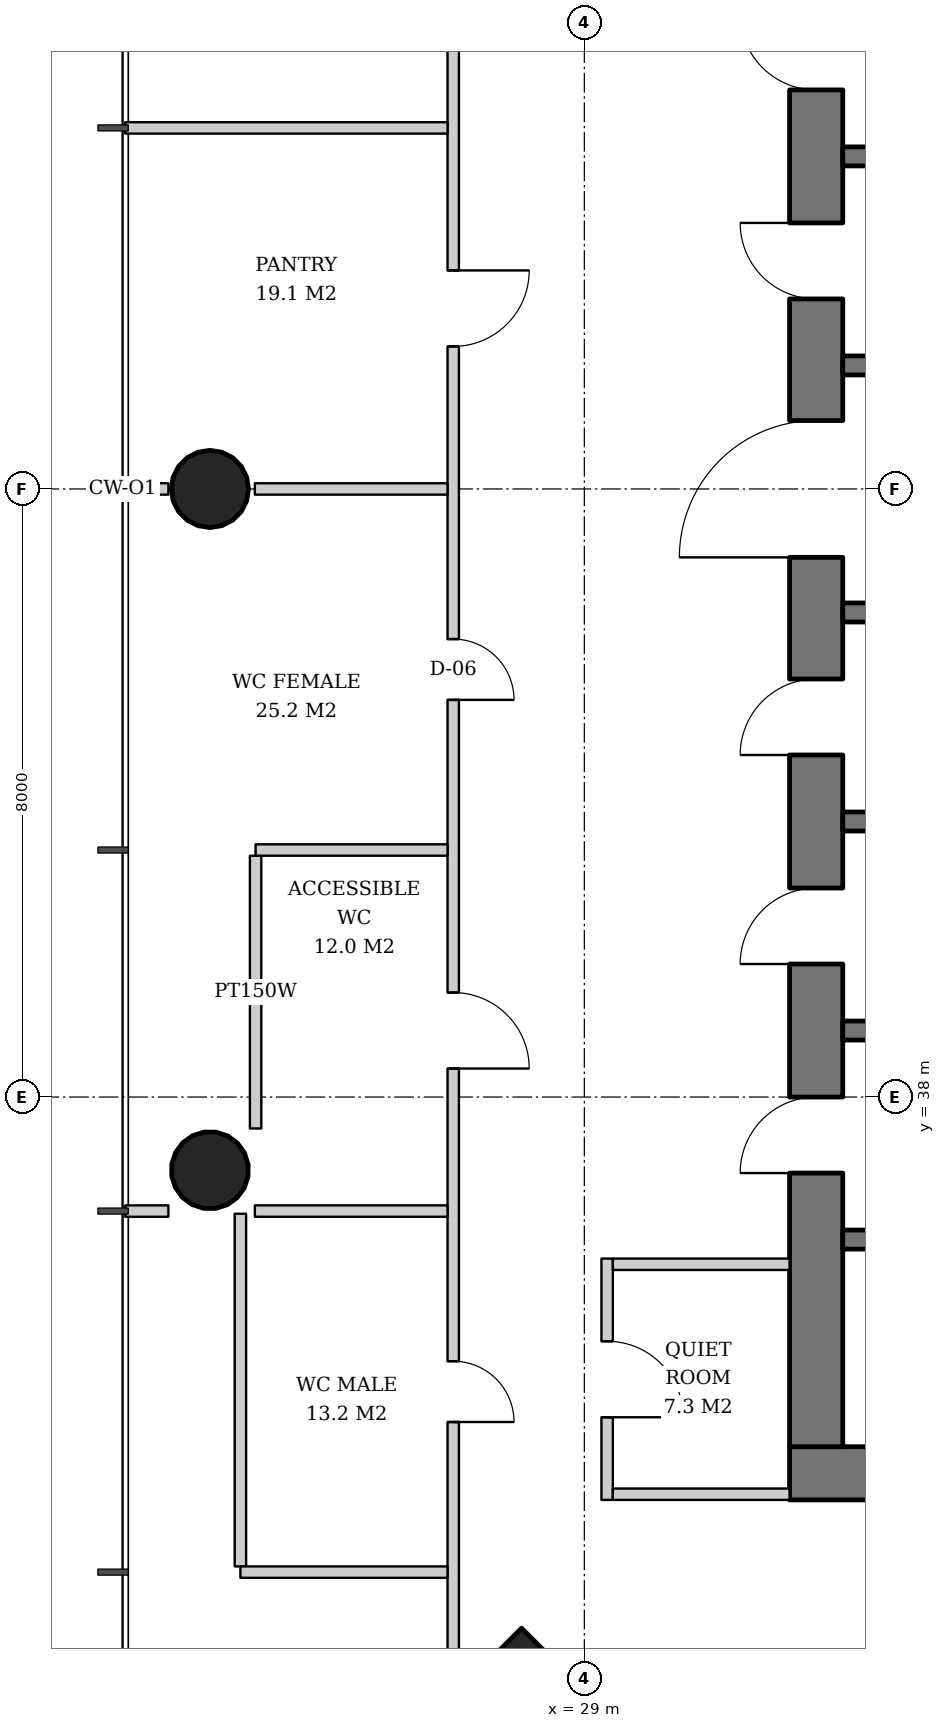
"""IFC4 building model, lengths in metres.
Left out: names, types, materials, properties, quantities, classifications, styles, units other than length and angle.
Written with IfcOpenShell. Run it as: python <this file> out.ifc"""

import sys

from ifc_helpers import new_model, si_unit, direction, frame, frame_2d, origin, origin_2d, place, context, subcontext, project, spatial, rectangle, hollow_circle, extrude, element, fill, save


model = new_model("IFC4")
c1 = context("Model", 3, precision=1e-05, world=origin(), true_north=direction((0.0, 1.0)))
c2 = subcontext(c1, "Body", "Model", "MODEL_VIEW")
j1 = project(units=[si_unit("LENGTHUNIT", "METRE"), si_unit("PLANEANGLEUNIT", "RADIAN")], contexts=[c1])
p1 = place(None, origin())
s1 = spatial("IfcSite", under=j1, at=p1, CompositionType="ELEMENT")
p2 = place(p1, origin())
s2 = spatial("IfcBuilding", under=s1, at=p2, CompositionType="ELEMENT")
p3 = place(p2, frame((0.0, 0.0, 116.0)))
s3 = spatial("IfcBuildingStorey", under=s2, at=p3, CompositionType="ELEMENT", Elevation=116.0)
p4 = place(p3, frame((28.136, 29.136, 0.0), z_axis=(0.031898107953, 0.031898107953, 0.998981992539), x_axis=(-0.707106781187, 0.707106781187, 0.0)))
e1 = element("IfcColumn", 1, at=p4, inside=s3, PredefinedType="COLUMN", context=c2, shape_type="SweptSolid", body=[
    extrude(rectangle(XDim=2.6, YDim=2.6, at=origin_2d()), origin(), (0.0, 0.0, 1.0), 3.804),
])
p5 = place(p3, frame((24.036, 46.0, 0.0), z_axis=(0.031978496719, 0.0, 0.999488557087), x_axis=(0.0, 1.0, 0.0)))
e2 = element("IfcColumn", 2, at=p5, inside=s3, PredefinedType="COLUMN", context=c2, shape_type="SweptSolid", body=[
    extrude(hollow_circle(Radius=0.508, WallThickness=0.04, at=origin_2d()), origin(), (0.0, 0.0, 1.0), 3.802),
])
p6 = place(p3, frame((24.036, 37.018, 0.0), z_axis=(0.031974409754, 0.015987204877, 0.999360818924), x_axis=(-0.4472135955, 0.894427191, 0.0)))
e3 = element("IfcColumn", 3, at=p6, inside=s3, PredefinedType="COLUMN", context=c2, shape_type="SweptSolid", body=[
    extrude(hollow_circle(Radius=0.508, WallThickness=0.04, at=origin_2d()), origin(), (0.0, 0.0, 1.0), 3.802),
])
p7 = place(p3, frame((31.7, 33.05, 0.0), z_axis=(0.0, 0.0, 1.0), x_axis=(1.0, 0.0, 0.0)))
e4 = element("IfcWall", 4, at=p7, inside=s3, PredefinedType="SHEAR", context=c2, shape_type="SweptSolid", body=[
    extrude(rectangle(XDim=26.6, YDim=0.7, at=frame_2d((13.3, 0.0))), origin(), (0.0, 0.0, 1.0), 3.8),
])
p8 = place(p7, frame((7.3, 0.0, 0.0)))
e5 = element("IfcOpeningElement", 5, at=p8, cuts=e4, PredefinedType="OPENING", context=c2, shape_type="SweptSolid", body=[
    extrude(rectangle(XDim=1.0, YDim=2.1, at=frame_2d((0.5, 1.05))), frame((0.0, 0.36, 0.0), z_axis=(0.0, -1.0, 0.0), x_axis=(1.0, 0.0, 0.0)), (0.0, 0.0, 1.0), 0.72),
])
p9 = place(p7, frame((18.75, 0.0, 0.0)))
e6 = element("IfcOpeningElement", 6, at=p9, cuts=e4, PredefinedType="OPENING", context=c2, shape_type="SweptSolid", body=[
    extrude(rectangle(XDim=1.0, YDim=2.1, at=frame_2d((0.5, 1.05))), frame((0.0, 0.36, 0.0), z_axis=(0.0, -1.0, 0.0), x_axis=(1.0, 0.0, 0.0)), (0.0, 0.0, 1.0), 0.72),
])
p10 = place(p7, frame((3.2, 0.0, 0.0)))
e7 = element("IfcOpeningElement", 7, at=p10, cuts=e4, PredefinedType="OPENING", context=c2, shape_type="SweptSolid", body=[
    extrude(rectangle(XDim=1.0, YDim=2.1, at=frame_2d((0.5, 1.05))), frame((0.0, 0.36, 0.0), z_axis=(0.0, -1.0, 0.0), x_axis=(1.0, 0.0, 0.0)), (0.0, 0.0, 1.0), 0.72),
])
p11 = place(p7, frame((10.42, 0.0, 0.0)))
e8 = element("IfcOpeningElement", 8, at=p11, cuts=e4, PredefinedType="OPENING", context=c2, shape_type="SweptSolid", body=[
    extrude(rectangle(XDim=1.0, YDim=2.1, at=frame_2d((0.5, 1.05))), frame((0.0, 0.36, 0.0), z_axis=(0.0, -1.0, 0.0), x_axis=(1.0, 0.0, 0.0)), (0.0, 0.0, 1.0), 0.72),
])
p12 = place(p7, frame((14.46, 0.0, 0.0)))
e9 = element("IfcOpeningElement", 9, at=p12, cuts=e4, PredefinedType="OPENING", context=c2, shape_type="SweptSolid", body=[
    extrude(rectangle(XDim=1.0, YDim=2.1, at=frame_2d((0.5, 1.05))), frame((0.0, 0.36, 0.0), z_axis=(0.0, -1.0, 0.0), x_axis=(1.0, 0.0, 0.0)), (0.0, 0.0, 1.0), 0.72),
])
p13 = place(p7, frame((22.5, 0.0, 0.0)))
e10 = element("IfcOpeningElement", 10, at=p13, cuts=e4, PredefinedType="OPENING", context=c2, shape_type="SweptSolid", body=[
    extrude(rectangle(XDim=1.0, YDim=2.1, at=frame_2d((0.5, 1.05))), frame((0.0, 0.36, 0.0), z_axis=(0.0, -1.0, 0.0), x_axis=(1.0, 0.0, 0.0)), (0.0, 0.0, 1.0), 0.72),
])
p14 = place(p3, frame((32.05, 33.4, 0.0), z_axis=(0.0, 0.0, 1.0), x_axis=(0.0, 1.0, 0.0)))
e11 = element("IfcWall", 11, at=p14, inside=s3, PredefinedType="SHEAR", context=c2, shape_type="SweptSolid", body=[
    extrude(rectangle(XDim=25.2, YDim=0.7, at=frame_2d((12.6, 0.0))), origin(), (0.0, 0.0, 1.0), 3.8),
])
p15 = place(p14, frame((11.7, 0.0, 0.0)))
e12 = element("IfcOpeningElement", 12, at=p15, cuts=e11, PredefinedType="OPENING", context=c2, shape_type="SweptSolid", body=[
    extrude(rectangle(XDim=1.8, YDim=2.4, at=frame_2d((0.9, 1.2))), frame((0.0, 0.36, 0.0), z_axis=(0.0, -1.0, 0.0), x_axis=(1.0, 0.0, 0.0)), (0.0, 0.0, 1.0), 0.72),
])
p16 = place(p14, frame((3.6, 0.0, 0.0)))
e13 = element("IfcOpeningElement", 13, at=p16, cuts=e11, PredefinedType="OPENING", context=c2, shape_type="SweptSolid", body=[
    extrude(rectangle(XDim=1.0, YDim=2.1, at=frame_2d((0.5, 1.05))), frame((0.0, 0.36, 0.0), z_axis=(0.0, -1.0, 0.0), x_axis=(1.0, 0.0, 0.0)), (0.0, 0.0, 1.0), 0.72),
])
p17 = place(p14, frame((6.35, 0.0, 0.0)))
e14 = element("IfcOpeningElement", 14, at=p17, cuts=e11, PredefinedType="OPENING", context=c2, shape_type="SweptSolid", body=[
    extrude(rectangle(XDim=1.0, YDim=2.1, at=frame_2d((0.5, 1.05))), frame((0.0, 0.36, 0.0), z_axis=(0.0, -1.0, 0.0), x_axis=(1.0, 0.0, 0.0)), (0.0, 0.0, 1.0), 0.72),
])
p18 = place(p14, frame((9.1, 0.0, 0.0)))
e15 = element("IfcOpeningElement", 15, at=p18, cuts=e11, PredefinedType="OPENING", context=c2, shape_type="SweptSolid", body=[
    extrude(rectangle(XDim=1.0, YDim=2.1, at=frame_2d((0.5, 1.05))), frame((0.0, 0.36, 0.0), z_axis=(0.0, -1.0, 0.0), x_axis=(1.0, 0.0, 0.0)), (0.0, 0.0, 1.0), 0.72),
])
p19 = place(p14, frame((15.1, 0.0, 0.0)))
e16 = element("IfcOpeningElement", 16, at=p19, cuts=e11, PredefinedType="OPENING", context=c2, shape_type="SweptSolid", body=[
    extrude(rectangle(XDim=1.0, YDim=2.1, at=frame_2d((0.5, 1.05))), frame((0.0, 0.36, 0.0), z_axis=(0.0, -1.0, 0.0), x_axis=(1.0, 0.0, 0.0)), (0.0, 0.0, 1.0), 0.72),
])
p20 = place(p14, frame((17.85, 0.0, 0.0)))
e17 = element("IfcOpeningElement", 17, at=p20, cuts=e11, PredefinedType="OPENING", context=c2, shape_type="SweptSolid", body=[
    extrude(rectangle(XDim=1.0, YDim=2.1, at=frame_2d((0.5, 1.05))), frame((0.0, 0.36, 0.0), z_axis=(0.0, -1.0, 0.0), x_axis=(1.0, 0.0, 0.0)), (0.0, 0.0, 1.0), 0.72),
])
for number, where, z_axis, x_axis in (
    (18, (32.4, 36.125, 0.0), (0.0, 0.0, 1.0), (1.0, 0.0, 0.0)),
    (19, (32.4, 38.875, 0.0), (0.0, 0.0, 1.0), (1.0, 0.0, 0.0)),
    (20, (32.4, 41.625, 0.0), (0.0, 0.0, 1.0), (1.0, 0.0, 0.0)),
    (21, (32.4, 44.375, 0.0), (0.0, 0.0, 1.0), (1.0, 0.0, 0.0)),
    (22, (32.4, 47.625, 0.0), (0.0, 0.0, 1.0), (1.0, 0.0, 0.0)),
    (23, (32.4, 50.375, 0.0), (0.0, 0.0, 1.0), (1.0, 0.0, 0.0)),
):
    element("IfcWall", number, at=place(p3, frame(where, z_axis=z_axis, x_axis=x_axis)), inside=s3, PredefinedType="SHEAR", context=c2, shape_type="SweptSolid", body=[
        extrude(rectangle(XDim=2.7, YDim=0.25, at=frame_2d((1.35, 0.0))), origin(), (0.0, 0.0, 1.0), 3.8),
    ])
p21 = place(p3, frame((29.3, 35.875, 0.0), z_axis=(0.0, 0.0, 1.0), x_axis=(0.0, -1.0, 0.0)))
e24 = element("IfcWall", 24, at=p21, inside=s3, PredefinedType="PARTITIONING", context=c2, shape_type="SweptSolid", body=[
    extrude(rectangle(XDim=3.175, YDim=0.15, at=frame_2d((1.587, 0.0))), origin(), (0.0, 0.0, 1.0), 2.806),
])
p22 = place(p21, frame((1.087, 0.0, 0.0)))
e25 = element("IfcOpeningElement", 25, at=p22, cuts=e24, PredefinedType="OPENING", context=c2, shape_type="SweptSolid", body=[
    extrude(rectangle(XDim=1.0, YDim=2.1, at=frame_2d((0.5, 1.05))), frame((0.0, 0.085, 0.0), z_axis=(0.0, -1.0, 0.0), x_axis=(1.0, 0.0, 0.0)), (0.0, 0.0, 1.0), 0.17),
])
for number, where, z_axis, x_axis in (
    (26, (31.7, 35.8, 0.0), (0.0, 0.0, 1.0), (-1.0, 0.0, 0.0)),
    (27, (31.7, 32.775, 0.0), (0.0, 0.0, 1.0), (-1.0, 0.0, 0.0)),
):
    element("IfcWall", number, at=place(p3, frame(where, z_axis=z_axis, x_axis=x_axis)), inside=s3, PredefinedType="PARTITIONING", context=c2, shape_type="SweptSolid", body=[
        extrude(rectangle(XDim=2.325, YDim=0.15, at=frame_2d((1.163, 0.0))), origin(), (0.0, 0.0, 1.0), 3.62),
    ])
p23 = place(p3, frame((24.675, 41.175, 0.0), z_axis=(0.0, 0.0, 1.0), x_axis=(0.0, -1.0, 0.0)))
e28 = element("IfcWall", 28, at=p23, inside=s3, PredefinedType="PARTITIONING", context=c2, shape_type="SweptSolid", body=[
    extrude(rectangle(XDim=3.588, YDim=0.15, at=frame_2d((1.794, 0.0))), origin(), (0.0, 0.0, 1.0), 2.806),
])
p24 = place(p3, frame((24.475, 36.465, 0.0), z_axis=(0.0, 0.0, 1.0), x_axis=(0.0, -1.0, 0.0)))
e29 = element("IfcWall", 29, at=p24, inside=s3, PredefinedType="PARTITIONING", context=c2, shape_type="SweptSolid", body=[
    extrude(rectangle(XDim=4.64, YDim=0.15, at=frame_2d((2.32, 0.0))), origin(), (0.0, 0.0, 1.0), 2.806),
])
p25 = place(p3, frame((27.275, 61.812, 0.0), z_axis=(0.0, 0.0, 1.0), x_axis=(0.0, -1.0, 0.0)))
e30 = element("IfcWall", 30, at=p25, inside=s3, PredefinedType="PARTITIONING", context=c2, shape_type="SweptSolid", body=[
    extrude(rectangle(XDim=31.623, YDim=0.15, at=frame_2d((15.812, 0.0))), origin(), (0.0, 0.0, 1.0), 2.72),
])
p26 = place(p25, frame((3.437, 0.0, 0.0)))
e31 = element("IfcOpeningElement", 31, at=p26, cuts=e30, PredefinedType="OPENING", context=c2, shape_type="SweptSolid", body=[
    extrude(rectangle(XDim=1.0, YDim=2.1, at=frame_2d((0.5, 1.05))), frame((0.0, 0.085, 0.0), z_axis=(0.0, -1.0, 0.0), x_axis=(1.0, 0.0, 0.0)), (0.0, 0.0, 1.0), 0.17),
])
p27 = place(p25, frame((8.187, 0.0, 0.0)))
e32 = element("IfcOpeningElement", 32, at=p27, cuts=e30, PredefinedType="OPENING", context=c2, shape_type="SweptSolid", body=[
    extrude(rectangle(XDim=1.0, YDim=2.1, at=frame_2d((0.5, 1.05))), frame((0.0, 0.085, 0.0), z_axis=(0.0, -1.0, 0.0), x_axis=(1.0, 0.0, 0.0)), (0.0, 0.0, 1.0), 0.17),
])
p28 = place(p25, frame((12.937, 0.0, 0.0)))
e33 = element("IfcOpeningElement", 33, at=p28, cuts=e30, PredefinedType="OPENING", context=c2, shape_type="SweptSolid", body=[
    extrude(rectangle(XDim=1.0, YDim=2.1, at=frame_2d((0.5, 1.05))), frame((0.0, 0.085, 0.0), z_axis=(0.0, -1.0, 0.0), x_axis=(1.0, 0.0, 0.0)), (0.0, 0.0, 1.0), 0.17),
])
p29 = place(p25, frame((17.787, 0.0, 0.0)))
e34 = element("IfcOpeningElement", 34, at=p29, cuts=e30, PredefinedType="OPENING", context=c2, shape_type="SweptSolid", body=[
    extrude(rectangle(XDim=0.8, YDim=2.1, at=frame_2d((0.4, 1.05))), frame((0.0, 0.085, 0.0), z_axis=(0.0, -1.0, 0.0), x_axis=(1.0, 0.0, 0.0)), (0.0, 0.0, 1.0), 0.17),
])
p30 = place(p25, frame((22.437, 0.0, 0.0)))
e35 = element("IfcOpeningElement", 35, at=p30, cuts=e30, PredefinedType="OPENING", context=c2, shape_type="SweptSolid", body=[
    extrude(rectangle(XDim=1.0, YDim=2.1, at=frame_2d((0.5, 1.05))), frame((0.0, 0.085, 0.0), z_axis=(0.0, -1.0, 0.0), x_axis=(1.0, 0.0, 0.0)), (0.0, 0.0, 1.0), 0.17),
])
p31 = place(p25, frame((27.287, 0.0, 0.0)))
e36 = element("IfcOpeningElement", 36, at=p31, cuts=e30, PredefinedType="OPENING", context=c2, shape_type="SweptSolid", body=[
    extrude(rectangle(XDim=0.8, YDim=2.1, at=frame_2d((0.4, 1.05))), frame((0.0, 0.085, 0.0), z_axis=(0.0, -1.0, 0.0), x_axis=(1.0, 0.0, 0.0)), (0.0, 0.0, 1.0), 0.17),
])
p32 = place(p3, frame((27.2, 50.75, 0.0), z_axis=(0.0, 0.0, 1.0), x_axis=(-1.0, 0.0, 0.0)))
e37 = element("IfcWall", 37, at=p32, inside=s3, PredefinedType="PARTITIONING", context=c2, shape_type="SweptSolid", body=[
    extrude(rectangle(XDim=4.24, YDim=0.15, at=frame_2d((2.12, 0.0))), origin(), (0.0, 0.0, 1.0), 2.82),
])
p33 = place(p3, frame((27.2, 46.0, 0.0), z_axis=(0.0, 0.0, 1.0), x_axis=(-1.0, 0.0, 0.0)))
e38 = element("IfcWall", 38, at=p33, inside=s3, PredefinedType="PARTITIONING", context=c2, shape_type="SweptSolid", body=[
    extrude(rectangle(XDim=2.535, YDim=0.15, at=frame_2d((1.268, 0.0))), origin(), (0.0, 0.0, 1.0), 3.62),
])
p34 = place(p3, frame((23.528, 46.0, 0.0), z_axis=(0.0, 0.0, 1.0), x_axis=(-1.0, 0.0, 0.0)))
e39 = element("IfcWall", 39, at=p34, inside=s3, PredefinedType="PARTITIONING", context=c2, shape_type="SweptSolid", body=[
    extrude(rectangle(XDim=0.568, YDim=0.15, at=frame_2d((0.284, 0.0))), origin(), (0.0, 0.0, 1.0), 3.62),
])
p35 = place(p3, frame((27.2, 41.25, 0.0), z_axis=(0.0, 0.0, 1.0), x_axis=(-1.0, 0.0, 0.0)))
e40 = element("IfcWall", 40, at=p35, inside=s3, PredefinedType="PARTITIONING", context=c2, shape_type="SweptSolid", body=[
    extrude(rectangle(XDim=2.525, YDim=0.15, at=frame_2d((1.262, 0.0))), origin(), (0.0, 0.0, 1.0), 3.62),
])
p36 = place(p3, frame((27.2, 36.5, 0.0), z_axis=(0.0, 0.0, 1.0), x_axis=(-1.0, 0.0, 0.0)))
e41 = element("IfcWall", 41, at=p36, inside=s3, PredefinedType="PARTITIONING", context=c2, shape_type="SweptSolid", body=[
    extrude(rectangle(XDim=2.535, YDim=0.15, at=frame_2d((1.268, 0.0))), origin(), (0.0, 0.0, 1.0), 3.62),
])
p37 = place(p3, frame((23.528, 36.5, 0.0), z_axis=(0.0, 0.0, 1.0), x_axis=(-1.0, 0.0, 0.0)))
e42 = element("IfcWall", 42, at=p37, inside=s3, PredefinedType="PARTITIONING", context=c2, shape_type="SweptSolid", body=[
    extrude(rectangle(XDim=0.568, YDim=0.15, at=frame_2d((0.284, 0.0))), origin(), (0.0, 0.0, 1.0), 3.62),
])
p38 = place(p3, frame((27.2, 31.75, 0.0), z_axis=(0.0, 0.0, 1.0), x_axis=(-1.0, 0.0, 0.0)))
e43 = element("IfcWall", 43, at=p38, inside=s3, PredefinedType="PARTITIONING", context=c2, shape_type="SweptSolid", body=[
    extrude(rectangle(XDim=2.725, YDim=0.15, at=frame_2d((1.362, 0.0))), origin(), (0.0, 0.0, 1.0), 3.62),
])
p39 = place(p15, origin())
e44 = element("IfcDoor", 44, at=p39, inside=s3, OperationType="DOUBLE_DOOR_SINGLE_SWING", PredefinedType="DOOR", context=c2, shape_type="SweptSolid", body=[
    extrude(rectangle(XDim=1.8, YDim=2.4, at=frame_2d((0.9, 1.2))), frame((0.0, 0.025, 0.0), z_axis=(0.0, -1.0, 0.0), x_axis=(1.0, 0.0, 0.0)), (0.0, 0.0, 1.0), 0.05),
])
fill(e12, e44)
p40 = place(p16, origin())
e45 = element("IfcDoor", 45, at=p40, inside=s3, OperationType="SINGLE_SWING_LEFT", PredefinedType="DOOR", context=c2, shape_type="SweptSolid", body=[
    extrude(rectangle(XDim=1.0, YDim=2.1, at=frame_2d((0.5, 1.05))), frame((0.0, -0.29, 0.0), z_axis=(0.0, -1.0, 0.0), x_axis=(1.0, 0.0, 0.0)), (0.0, 0.0, 1.0), 0.05),
])
fill(e13, e45)
p41 = place(p17, origin())
e46 = element("IfcDoor", 46, at=p41, inside=s3, OperationType="SINGLE_SWING_LEFT", PredefinedType="DOOR", context=c2, shape_type="SweptSolid", body=[
    extrude(rectangle(XDim=1.0, YDim=2.1, at=frame_2d((0.5, 1.05))), frame((0.0, -0.29, 0.0), z_axis=(0.0, -1.0, 0.0), x_axis=(1.0, 0.0, 0.0)), (0.0, 0.0, 1.0), 0.05),
])
fill(e14, e46)
p42 = place(p18, origin())
e47 = element("IfcDoor", 47, at=p42, inside=s3, OperationType="SINGLE_SWING_LEFT", PredefinedType="DOOR", context=c2, shape_type="SweptSolid", body=[
    extrude(rectangle(XDim=1.0, YDim=2.1, at=frame_2d((0.5, 1.05))), frame((0.0, -0.29, 0.0), z_axis=(0.0, -1.0, 0.0), x_axis=(1.0, 0.0, 0.0)), (0.0, 0.0, 1.0), 0.05),
])
fill(e15, e47)
p43 = place(p19, origin())
e48 = element("IfcDoor", 48, at=p43, inside=s3, OperationType="SINGLE_SWING_RIGHT", PredefinedType="DOOR", context=c2, shape_type="SweptSolid", body=[
    extrude(rectangle(XDim=1.0, YDim=2.1, at=frame_2d((0.5, 1.05))), frame((0.0, -0.29, 0.0), z_axis=(0.0, -1.0, 0.0), x_axis=(1.0, 0.0, 0.0)), (0.0, 0.0, 1.0), 0.05),
])
fill(e16, e48)
p44 = place(p20, origin())
e49 = element("IfcDoor", 49, at=p44, inside=s3, OperationType="SINGLE_SWING_RIGHT", PredefinedType="DOOR", context=c2, shape_type="SweptSolid", body=[
    extrude(rectangle(XDim=1.0, YDim=2.1, at=frame_2d((0.5, 1.05))), frame((0.0, -0.29, 0.0), z_axis=(0.0, -1.0, 0.0), x_axis=(1.0, 0.0, 0.0)), (0.0, 0.0, 1.0), 0.05),
])
fill(e17, e49)
p45 = place(p22, origin())
e50 = element("IfcDoor", 50, at=p45, inside=s3, OperationType="SINGLE_SWING_RIGHT", PredefinedType="DOOR", context=c2, shape_type="SweptSolid", body=[
    extrude(rectangle(XDim=1.0, YDim=2.1, at=frame_2d((0.5, 1.05))), frame((0.0, 0.025, 0.0), z_axis=(0.0, -1.0, 0.0), x_axis=(1.0, 0.0, 0.0)), (0.0, 0.0, 1.0), 0.05),
])
fill(e25, e50)
p46 = place(p28, origin())
e51 = element("IfcDoor", 51, at=p46, inside=s3, OperationType="SINGLE_SWING_LEFT", PredefinedType="DOOR", context=c2, shape_type="SweptSolid", body=[
    extrude(rectangle(XDim=1.0, YDim=2.1, at=frame_2d((0.5, 1.05))), frame((0.0, 0.025, 0.0), z_axis=(0.0, -1.0, 0.0), x_axis=(1.0, 0.0, 0.0)), (0.0, 0.0, 1.0), 0.05),
])
fill(e33, e51)
p47 = place(p29, origin())
e52 = element("IfcDoor", 52, at=p47, inside=s3, OperationType="SINGLE_SWING_RIGHT", PredefinedType="DOOR", context=c2, shape_type="SweptSolid", body=[
    extrude(rectangle(XDim=0.8, YDim=2.1, at=frame_2d((0.4, 1.05))), frame((0.0, 0.025, 0.0), z_axis=(0.0, -1.0, 0.0), x_axis=(1.0, 0.0, 0.0)), (0.0, 0.0, 1.0), 0.05),
])
fill(e34, e52)
p48 = place(p30, origin())
e53 = element("IfcDoor", 53, at=p48, inside=s3, OperationType="SINGLE_SWING_RIGHT", PredefinedType="DOOR", context=c2, shape_type="SweptSolid", body=[
    extrude(rectangle(XDim=1.0, YDim=2.1, at=frame_2d((0.5, 1.05))), frame((0.0, 0.025, 0.0), z_axis=(0.0, -1.0, 0.0), x_axis=(1.0, 0.0, 0.0)), (0.0, 0.0, 1.0), 0.05),
])
fill(e35, e53)
p49 = place(p31, origin())
e54 = element("IfcDoor", 54, at=p49, inside=s3, OperationType="SINGLE_SWING_RIGHT", PredefinedType="DOOR", context=c2, shape_type="SweptSolid", body=[
    extrude(rectangle(XDim=0.8, YDim=2.1, at=frame_2d((0.4, 1.05))), frame((0.0, 0.025, 0.0), z_axis=(0.0, -1.0, 0.0), x_axis=(1.0, 0.0, 0.0)), (0.0, 0.0, 1.0), 0.05),
])
fill(e36, e54)
save(model, sys.argv[1])
